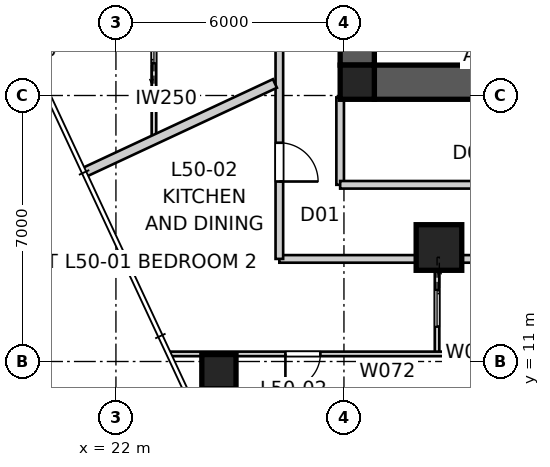
"""IFC4 building model, lengths in metres.
Left out: names, types, materials, properties, quantities, classifications, styles, units other than length and angle.
Written with IfcOpenShell. Run it as: python <this file> out.ifc"""

import sys

from ifc_helpers import new_model, si_unit, direction, frame, frame_2d, origin, origin_2d, place, context, subcontext, project, spatial, polyline, rectangle, outline, extrude, element, fill, save


model = new_model("IFC4")
c1 = context("Model", 3, precision=1e-05, world=origin(), true_north=direction((0.0, 1.0)))
c2 = subcontext(c1, "Body", "Model", "MODEL_VIEW")
j1 = project(units=[si_unit("LENGTHUNIT", "METRE"), si_unit("PLANEANGLEUNIT", "RADIAN")], contexts=[c1])
p1 = place(None, origin())
s1 = spatial("IfcSite", under=j1, at=p1, CompositionType="ELEMENT")
p2 = place(p1, origin())
s2 = spatial("IfcBuilding", under=s1, at=p2, CompositionType="ELEMENT")
p3 = place(p2, frame((0.0, 0.0, 182.8)))
s3 = spatial("IfcBuildingStorey", under=s2, at=p3, CompositionType="ELEMENT", Elevation=182.8)
p4 = place(p3, frame((51.2, 18.35, 0.0), z_axis=(0.0, 0.0, 1.0), x_axis=(-1.0, 0.0, 0.0)))
e1 = element("IfcWall", 1, at=p4, inside=s3, PredefinedType="SHEAR", context=c2, shape_type="SweptSolid", body=[
    extrude(outline(polyline([(0.0, -0.45), (22.4, -0.45), (22.4, -0.025), (22.85, -0.025), (22.85, 0.025), (22.4, 0.025), (22.4, 0.45), (0.0, 0.45), (0.0, 0.025), (-0.45, 0.025), (-0.45, -0.025), (0.0, -0.025), (0.0, -0.45)])), origin(), (0.0, 0.0, 1.0), 3.4),
])
p5 = place(p3, frame((28.35, 41.2, 0.0), z_axis=(0.0, 0.0, 1.0), x_axis=(0.0, -1.0, 0.0)))
e2 = element("IfcWall", 2, at=p5, inside=s3, PredefinedType="SHEAR", context=c2, shape_type="SweptSolid", body=[
    extrude(outline(polyline([(0.0, -0.45), (22.4, -0.45), (22.4, -0.025), (22.85, -0.025), (22.85, 0.025), (22.4, 0.025), (22.4, 0.45), (0.0, 0.45), (0.0, 0.025), (-0.45, 0.025), (-0.45, -0.025), (0.0, -0.025), (0.0, -0.45)])), origin(), (0.0, 0.0, 1.0), 3.4),
])
p6 = place(p5, frame((11.14, 0.0, 0.0)))
e3 = element("IfcOpeningElement", 3, at=p6, cuts=e2, PredefinedType="OPENING", context=c2, shape_type="SweptSolid", body=[
    extrude(rectangle(XDim=1.02, YDim=2.4, at=frame_2d((0.51, 1.2))), frame((0.0, 0.46, 0.0), z_axis=(0.0, -1.0, 0.0), x_axis=(1.0, 0.0, 0.0)), (0.0, 0.0, 1.0), 0.92),
])
for number, where, z_axis, x_axis in (
    (4, (28.35, 18.35, 0.0), (0.0, 0.0, 1.0), (1.0, 0.0, 0.0)),
    (5, (24.71, 10.733, 0.0), (0.0, 0.0, 1.0), (1.0, 0.0, 0.0)),
):
    element("IfcColumn", number, at=place(p3, frame(where, z_axis=z_axis, x_axis=x_axis)), inside=s3, PredefinedType="COLUMN", context=c2, shape_type="SweptSolid", body=[
        extrude(rectangle(XDim=0.9, YDim=0.9, at=origin_2d()), origin(), (0.0, 0.0, 1.0), 3.4),
    ])
p7 = place(p3, frame((30.5, 14.0, 0.0), z_axis=(0.0, 0.0, 1.0), x_axis=(1.0, 0.0, 0.0)))
e6 = element("IfcColumn", 6, at=p7, inside=s3, PredefinedType="COLUMN", context=c2, shape_type="SweptSolid", body=[
    extrude(rectangle(XDim=1.2, YDim=1.2, at=origin_2d()), origin(), (0.0, 0.0, 1.0), 3.4),
])
p8 = place(p3, frame((26.3, 13.7, 0.0), z_axis=(0.0, 0.0, 1.0), x_axis=(1.0, 0.0, 0.0)))
e7 = element("IfcWall", 7, at=p8, inside=s3, PredefinedType="PARTITIONING", context=c2, shape_type="SweptSolid", body=[
    extrude(rectangle(XDim=4.458, YDim=0.2, at=frame_2d((2.229, 0.0))), origin(), (0.0, 0.0, 1.0), 3.25),
])
p9 = place(p3, frame((30.758, 13.7, 0.0), z_axis=(0.0, 0.0, 1.0), x_axis=(1.0, 0.0, 0.0)))
e8 = element("IfcWall", 8, at=p9, inside=s3, PredefinedType="PARTITIONING", context=c2, shape_type="SweptSolid", body=[
    extrude(rectangle(XDim=1.683, YDim=0.2, at=frame_2d((0.842, 0.0))), origin(), (0.0, 0.0, 1.0), 2.55),
])
p10 = place(p3, frame((26.3, 46.3, 0.0), z_axis=(0.0, 0.0, 1.0), x_axis=(0.0, -1.0, 0.0)))
e9 = element("IfcWall", 9, at=p10, inside=s3, PredefinedType="PARTITIONING", context=c2, shape_type="SweptSolid", body=[
    extrude(rectangle(XDim=32.6, YDim=0.2, at=frame_2d((16.3, 0.0))), origin(), (0.0, 0.0, 1.0), 3.25),
])
p11 = place(p10, frame((3.156, 0.0, 0.0)))
e10 = element("IfcOpeningElement", 10, at=p11, cuts=e9, PredefinedType="OPENING", context=c2, shape_type="SweptSolid", body=[
    extrude(rectangle(XDim=1.02, YDim=2.1, at=frame_2d((0.51, 1.05))), frame((0.0, 0.11, 0.0), z_axis=(0.0, -1.0, 0.0), x_axis=(1.0, 0.0, 0.0)), (0.0, 0.0, 1.0), 0.22),
])
p12 = place(p10, frame((14.68, 0.0, 0.0)))
e11 = element("IfcOpeningElement", 11, at=p12, cuts=e9, PredefinedType="OPENING", context=c2, shape_type="SweptSolid", body=[
    extrude(rectangle(XDim=1.02, YDim=2.34, at=frame_2d((0.51, 1.17))), frame((0.0, 0.11, 0.0), z_axis=(0.0, -1.0, 0.0), x_axis=(1.0, 0.0, 0.0)), (0.0, 0.0, 1.0), 0.22),
])
p13 = place(p10, frame((29.543, 0.0, 0.0)))
e12 = element("IfcOpeningElement", 12, at=p13, cuts=e9, PredefinedType="OPENING", context=c2, shape_type="SweptSolid", body=[
    extrude(rectangle(XDim=1.02, YDim=2.34, at=frame_2d((0.51, 1.17))), frame((0.0, 0.11, 0.0), z_axis=(0.0, -1.0, 0.0), x_axis=(1.0, 0.0, 0.0)), (0.0, 0.0, 1.0), 0.22),
])
p14 = place(p3, frame((21.162, 15.975, 0.0), z_axis=(0.0, 0.0, 1.0), x_axis=(0.906309193024, 0.422615246577, 0.0)))
e13 = element("IfcWall", 13, at=p14, inside=s3, PredefinedType="PARTITIONING", context=c2, shape_type="SweptSolid", body=[
    extrude(rectangle(XDim=5.54, YDim=0.25, at=frame_2d((2.77, 0.0))), origin(), (0.0, 0.0, 1.0), 3.25),
])
p15 = place(p3, frame((27.9, 17.95, 0.0), z_axis=(0.0, 0.0, 1.0), x_axis=(0.0, -1.0, 0.0)))
e14 = element("IfcWall", 14, at=p15, inside=s3, PredefinedType="PARTITIONING", context=c2, shape_type="SweptSolid", body=[
    extrude(rectangle(XDim=2.3, YDim=0.2, at=frame_2d((1.15, 0.0))), origin(), (0.0, 0.0, 1.0), 3.25),
])
p16 = place(p3, frame((27.9, 15.65, 0.0), z_axis=(0.0, 0.0, 1.0), x_axis=(1.0, 0.0, 0.0)))
e15 = element("IfcWall", 15, at=p16, inside=s3, PredefinedType="PARTITIONING", context=c2, shape_type="SweptSolid", body=[
    extrude(rectangle(XDim=24.2, YDim=0.2, at=frame_2d((12.1, 0.0))), origin(), (0.0, 0.0, 1.0), 3.25),
])
p17 = place(p16, frame((4.391, 0.0, 0.0)))
e16 = element("IfcOpeningElement", 16, at=p17, cuts=e15, PredefinedType="OPENING", context=c2, shape_type="SweptSolid", body=[
    extrude(rectangle(XDim=1.02, YDim=2.1, at=frame_2d((0.51, 1.05))), frame((0.0, 0.11, 0.0), z_axis=(0.0, -1.0, 0.0), x_axis=(1.0, 0.0, 0.0)), (0.0, 0.0, 1.0), 0.22),
])
p18 = place(p16, frame((18.789, 0.0, 0.0)))
e17 = element("IfcOpeningElement", 17, at=p18, cuts=e15, PredefinedType="OPENING", context=c2, shape_type="SweptSolid", body=[
    extrude(rectangle(XDim=1.02, YDim=2.1, at=frame_2d((0.51, 1.05))), frame((0.0, 0.11, 0.0), z_axis=(0.0, -1.0, 0.0), x_axis=(1.0, 0.0, 0.0)), (0.0, 0.0, 1.0), 0.22),
])
p19 = place(p16, frame((11.59, 0.0, 0.0)))
e18 = element("IfcOpeningElement", 18, at=p19, cuts=e15, PredefinedType="OPENING", context=c2, shape_type="SweptSolid", body=[
    extrude(rectangle(XDim=1.02, YDim=2.1, at=frame_2d((0.51, 1.05))), frame((0.0, 0.11, 0.0), z_axis=(0.0, -1.0, 0.0), x_axis=(1.0, 0.0, 0.0)), (0.0, 0.0, 1.0), 0.22),
])
p20 = place(p3, frame((23.0, 16.832, 0.0), z_axis=(0.0, 0.0, 1.0), x_axis=(0.0, 1.0, 0.0)))
e19 = element("IfcWall", 19, at=p20, inside=s3, PredefinedType="PARTITIONING", context=c2, shape_type="SweptSolid", body=[
    extrude(rectangle(XDim=30.574, YDim=0.12, at=frame_2d((15.287, 0.0))), origin(), (0.0, 0.0, 1.0), 2.55),
])
p21 = place(p20, frame((26.093, 0.0, 0.0)))
e20 = element("IfcOpeningElement", 20, at=p21, cuts=e19, PredefinedType="OPENING", context=c2, shape_type="SweptSolid", body=[
    extrude(rectangle(XDim=0.92, YDim=2.34, at=frame_2d((0.46, 1.17))), frame((0.0, 0.07, 0.0), z_axis=(0.0, -1.0, 0.0), x_axis=(1.0, 0.0, 0.0)), (0.0, 0.0, 1.0), 0.14),
])
p22 = place(p20, frame((13.012, 0.0, 0.0)))
e21 = element("IfcOpeningElement", 21, at=p22, cuts=e19, PredefinedType="OPENING", context=c2, shape_type="SweptSolid", body=[
    extrude(rectangle(XDim=0.92, YDim=2.34, at=frame_2d((0.46, 1.17))), frame((0.0, 0.07, 0.0), z_axis=(0.0, -1.0, 0.0), x_axis=(1.0, 0.0, 0.0)), (0.0, 0.0, 1.0), 0.14),
])
p23 = place(p20, frame((19.16, 0.0, 0.0)))
e22 = element("IfcOpeningElement", 22, at=p23, cuts=e19, PredefinedType="OPENING", context=c2, shape_type="SweptSolid", body=[
    extrude(rectangle(XDim=0.96, YDim=2.1, at=frame_2d((0.48, 1.05))), frame((0.0, 0.07, 0.0), z_axis=(0.0, -1.0, 0.0), x_axis=(1.0, 0.0, 0.0)), (0.0, 0.0, 1.0), 0.14),
])
p24 = place(p20, frame((2.018, 0.0, 0.0)))
e23 = element("IfcOpeningElement", 23, at=p24, cuts=e19, PredefinedType="OPENING", context=c2, shape_type="SweptSolid", body=[
    extrude(rectangle(XDim=0.96, YDim=2.1, at=frame_2d((0.48, 1.05))), frame((0.0, 0.07, 0.0), z_axis=(0.0, -1.0, 0.0), x_axis=(1.0, 0.0, 0.0)), (0.0, 0.0, 1.0), 0.14),
])
p25 = place(p3, frame((30.45, 13.6, 0.0), z_axis=(0.0, 0.0, 1.0), x_axis=(0.0, -1.0, 0.0)))
e24 = element("IfcWall", 24, at=p25, inside=s3, PredefinedType="PARTITIONING", context=c2, shape_type="SweptSolid", body=[
    extrude(rectangle(XDim=2.4, YDim=0.12, at=frame_2d((1.2, 0.0))), origin(), (0.0, 0.0, 1.0), 3.25),
])
p26 = place(p25, frame((0.72, 0.0, 0.0)))
e25 = element("IfcOpeningElement", 25, at=p26, cuts=e24, PredefinedType="OPENING", context=c2, shape_type="SweptSolid", body=[
    extrude(rectangle(XDim=0.96, YDim=2.1, at=frame_2d((0.48, 1.05))), frame((0.0, 0.07, 0.0), z_axis=(0.0, -1.0, 0.0), x_axis=(1.0, 0.0, 0.0)), (0.0, 0.0, 1.0), 0.14),
])
p27 = place(p3, frame((33.25, 11.2, 0.0), z_axis=(0.0, 0.0, 1.0), x_axis=(-1.0, 0.0, 0.0)))
e26 = element("IfcWall", 26, at=p27, inside=s3, PredefinedType="PARTITIONING", context=c2, shape_type="SweptSolid", body=[
    extrude(rectangle(XDim=9.817, YDim=0.12, at=frame_2d((4.908, 0.0))), origin(), (0.0, 0.0, 1.0), 3.25),
])
p28 = place(p27, frame((5.871, 0.0, 0.0)))
e27 = element("IfcOpeningElement", 27, at=p28, cuts=e26, PredefinedType="OPENING", context=c2, shape_type="SweptSolid", body=[
    extrude(rectangle(XDim=0.92, YDim=2.34, at=frame_2d((0.46, 1.17))), frame((0.0, 0.07, 0.0), z_axis=(0.0, -1.0, 0.0), x_axis=(1.0, 0.0, 0.0)), (0.0, 0.0, 1.0), 0.14),
])
p29 = place(p3, frame((25.213, 7.382, 0.0), z_axis=(0.0, 0.0, 1.0), x_axis=(0.906310464333, 0.422612520212, 0.0)))
e28 = element("IfcWall", 28, at=p29, inside=s3, PredefinedType="PARTITIONING", context=c2, shape_type="SweptSolid", body=[
    extrude(rectangle(XDim=8.913, YDim=0.12, at=frame_2d((4.456, 0.0))), origin(), (0.0, 0.0, 1.0), 3.25),
])
p30 = place(p13, origin())
e29 = element("IfcDoor", 29, at=p30, inside=s3, OperationType="SINGLE_SWING_RIGHT", PredefinedType="DOOR", context=c2, shape_type="SweptSolid", body=[
    extrude(rectangle(XDim=1.02, YDim=2.34, at=frame_2d((0.51, 1.17))), frame((0.0, 0.025, 0.0), z_axis=(0.0, -1.0, 0.0), x_axis=(1.0, 0.0, 0.0)), (0.0, 0.0, 1.0), 0.05),
])
fill(e12, e29)
p31 = place(p28, origin())
e30 = element("IfcDoor", 30, at=p31, inside=s3, OperationType="SINGLE_SWING_RIGHT", PredefinedType="DOOR", context=c2, shape_type="SweptSolid", body=[
    extrude(rectangle(XDim=0.92, YDim=2.34, at=frame_2d((0.46, 1.17))), frame((0.0, 0.025, 0.0), z_axis=(0.0, -1.0, 0.0), x_axis=(1.0, 0.0, 0.0)), (0.0, 0.0, 1.0), 0.05),
])
fill(e27, e30)
p32 = place(p26, origin())
e31 = element("IfcDoor", 31, at=p32, inside=s3, OperationType="SLIDING_TO_LEFT", PredefinedType="DOOR", context=c2, shape_type="SweptSolid", body=[
    extrude(rectangle(XDim=0.96, YDim=2.1, at=frame_2d((0.48, 1.05))), frame((0.0, 0.025, 0.0), z_axis=(0.0, -1.0, 0.0), x_axis=(1.0, 0.0, 0.0)), (0.0, 0.0, 1.0), 0.05),
])
fill(e25, e31)
p33 = place(p24, origin())
e32 = element("IfcDoor", 32, at=p33, inside=s3, OperationType="SLIDING_TO_LEFT", PredefinedType="DOOR", context=c2, shape_type="SweptSolid", body=[
    extrude(rectangle(XDim=0.96, YDim=2.1, at=frame_2d((0.48, 1.05))), frame((0.0, 0.025, 0.0), z_axis=(0.0, -1.0, 0.0), x_axis=(1.0, 0.0, 0.0)), (0.0, 0.0, 1.0), 0.05),
])
fill(e23, e32)
save(model, sys.argv[1])
